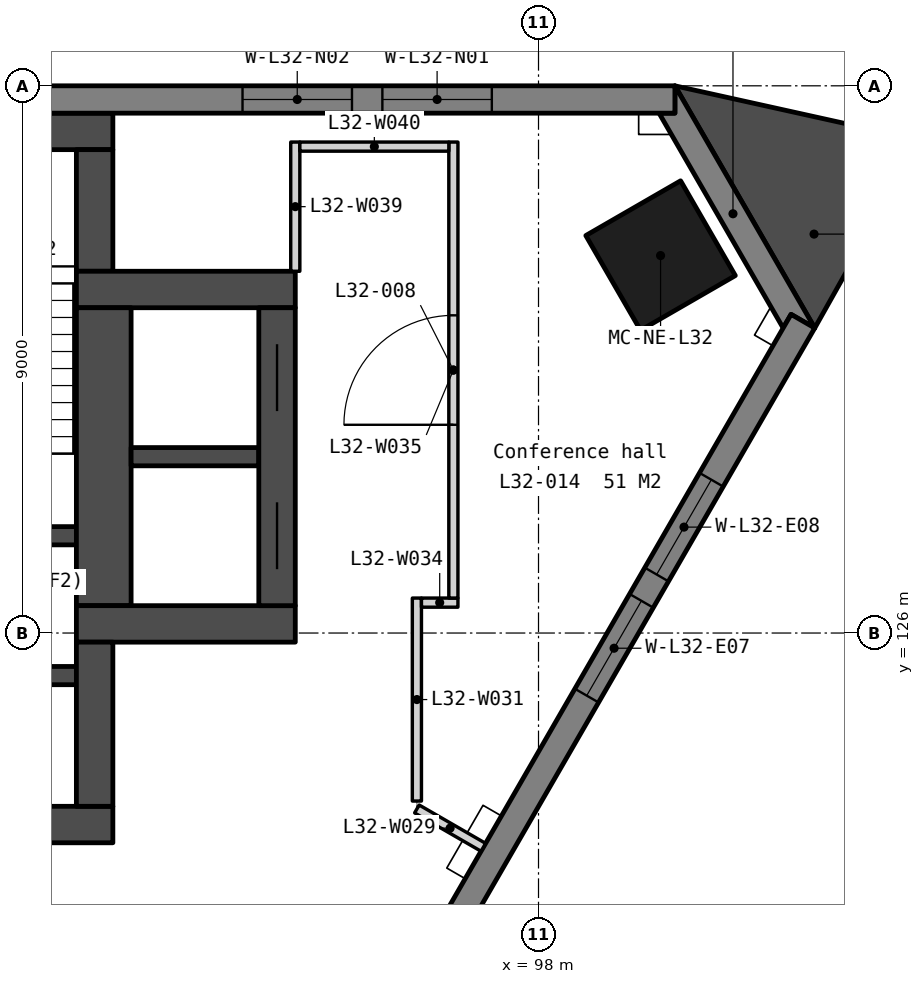
"""IFC4 building model, lengths in metres.
Left out: names, types, materials, properties, quantities, classifications, styles, units other than length and angle.
Written with IfcOpenShell. Run it as: python <this file> out.ifc"""

import sys

from ifc_helpers import new_model, si_unit, direction, frame, frame_2d, origin, origin_2d, place, context, subcontext, project, spatial, polyline, rectangle, outline, extrude, element, fill, save


model = new_model("IFC4")
c1 = context("Model", 3, precision=1e-05, world=origin(), true_north=direction((0.0, 1.0)))
c2 = subcontext(c1, "Body", "Model", "MODEL_VIEW")
j1 = project(units=[si_unit("LENGTHUNIT", "METRE"), si_unit("PLANEANGLEUNIT", "RADIAN")], contexts=[c1])
p1 = place(None, origin())
s1 = spatial("IfcSite", under=j1, at=p1, CompositionType="ELEMENT")
p2 = place(p1, origin())
s2 = spatial("IfcBuilding", under=s1, at=p2, CompositionType="ELEMENT")
p3 = place(p2, frame((0.0, 0.0, 128.6)))
s3 = spatial("IfcBuildingStorey", under=s2, at=p3, CompositionType="ELEMENT", Elevation=128.6)
p4 = place(p3, frame((100.007, 132.208, 0.0), z_axis=(0.0, 0.0, 1.0), x_axis=(-0.5, 0.866025403784, 0.0)))
e1 = element("IfcColumn", 1, at=p4, inside=s3, PredefinedType="COLUMN", context=c2, shape_type="SweptSolid", body=[
    extrude(rectangle(XDim=1.8, YDim=1.8, at=origin_2d()), origin(), (0.0, 0.0, 1.0), 3.9),
])
p5 = place(p3, frame((69.0, 134.25, 0.0), z_axis=(0.0, 0.0, 1.0), x_axis=(1.0, 0.0, 0.0)))
e2 = element("IfcWall", 2, at=p5, inside=s3, PredefinedType="SOLIDWALL", context=c2, shape_type="SweptSolid", body=[
    extrude(rectangle(XDim=22.0, YDim=0.6, at=frame_2d((11.0, 0.0))), origin(), (0.0, 0.0, 1.0), 3.75),
])
p6 = place(p3, frame((69.0, 122.85, 0.0), z_axis=(0.0, 0.0, 1.0), x_axis=(1.0, 0.0, 0.0)))
e3 = element("IfcWall", 3, at=p6, inside=s3, PredefinedType="SOLIDWALL", context=c2, shape_type="SweptSolid", body=[
    extrude(rectangle(XDim=22.0, YDim=0.6, at=frame_2d((11.0, 0.0))), origin(), (0.0, 0.0, 1.0), 3.75),
])
p7 = place(p6, frame((16.375, 0.0, 0.0)))
e4 = element("IfcOpeningElement", 4, at=p7, cuts=e3, PredefinedType="OPENING", context=c2, shape_type="SweptSolid", body=[
    extrude(rectangle(XDim=1.8, YDim=2.1, at=frame_2d((0.9, 1.05))), frame((0.0, 0.31, 0.0), z_axis=(0.0, -1.0, 0.0), x_axis=(1.0, 0.0, 0.0)), (0.0, 0.0, 1.0), 0.62),
])
p8 = place(p6, frame((3.825, 0.0, 0.0)))
e5 = element("IfcOpeningElement", 5, at=p8, cuts=e3, PredefinedType="OPENING", context=c2, shape_type="SweptSolid", body=[
    extrude(rectangle(XDim=1.8, YDim=2.1, at=frame_2d((0.9, 1.05))), frame((0.0, 0.31, 0.0), z_axis=(0.0, -1.0, 0.0), x_axis=(1.0, 0.0, 0.0)), (0.0, 0.0, 1.0), 0.62),
])
p9 = place(p6, frame((12.85, 0.0, 0.0)))
e6 = element("IfcOpeningElement", 6, at=p9, cuts=e3, PredefinedType="OPENING", context=c2, shape_type="SweptSolid", body=[
    extrude(rectangle(XDim=1.5, YDim=2.1, at=frame_2d((0.75, 1.05))), frame((0.0, 0.31, 0.0), z_axis=(0.0, -1.0, 0.0), x_axis=(1.0, 0.0, 0.0)), (0.0, 0.0, 1.0), 0.62),
])
for number, where, z_axis, x_axis in (
    (7, (87.85, 127.6, 0.0), (0.0, 0.0, 1.0), (1.0, 0.0, 0.0)),
    (8, (87.85, 125.3, 0.0), (0.0, 0.0, 1.0), (1.0, 0.0, 0.0)),
):
    element("IfcWall", number, at=place(p3, frame(where, z_axis=z_axis, x_axis=x_axis)), inside=s3, PredefinedType="SOLIDWALL", context=c2, shape_type="SweptSolid", body=[
        extrude(rectangle(XDim=2.55, YDim=0.3, at=frame_2d((1.275, 0.0))), origin(), (0.0, 0.0, 1.0), 3.75),
    ])
p10 = place(p3, frame((90.7, 133.95, 0.0), z_axis=(0.0, 0.0, 1.0), x_axis=(0.0, -1.0, 0.0)))
e9 = element("IfcWall", 9, at=p10, inside=s3, PredefinedType="SOLIDWALL", context=c2, shape_type="SweptSolid", body=[
    extrude(rectangle(XDim=2.0, YDim=0.6, at=frame_2d((1.0, 0.0))), origin(), (0.0, 0.0, 1.0), 3.75),
])
p11 = place(p3, frame((90.4, 131.65, 0.0), z_axis=(0.0, 0.0, 1.0), x_axis=(1.0, 0.0, 0.0)))
e10 = element("IfcWall", 10, at=p11, inside=s3, PredefinedType="SOLIDWALL", context=c2, shape_type="SweptSolid", body=[
    extrude(rectangle(XDim=3.6, YDim=0.6, at=frame_2d((1.8, 0.0))), origin(), (0.0, 0.0, 1.0), 3.75),
])
p12 = place(p3, frame((90.85, 131.35, 0.0), z_axis=(0.0, 0.0, 1.0), x_axis=(0.0, -1.0, 0.0)))
e11 = element("IfcWall", 11, at=p12, inside=s3, PredefinedType="SOLIDWALL", context=c2, shape_type="SweptSolid", body=[
    extrude(rectangle(XDim=4.9, YDim=0.9, at=frame_2d((2.45, 0.0))), origin(), (0.0, 0.0, 1.0), 3.75),
])
p13 = place(p3, frame((90.4, 126.15, 0.0), z_axis=(0.0, 0.0, 1.0), x_axis=(1.0, 0.0, 0.0)))
e12 = element("IfcWall", 12, at=p13, inside=s3, PredefinedType="SOLIDWALL", context=c2, shape_type="SweptSolid", body=[
    extrude(rectangle(XDim=3.6, YDim=0.6, at=frame_2d((1.8, 0.0))), origin(), (0.0, 0.0, 1.0), 3.75),
])
p14 = place(p3, frame((90.7, 125.85, 0.0), z_axis=(0.0, 0.0, 1.0), x_axis=(0.0, -1.0, 0.0)))
e13 = element("IfcWall", 13, at=p14, inside=s3, PredefinedType="SOLIDWALL", context=c2, shape_type="SweptSolid", body=[
    extrude(rectangle(XDim=2.7, YDim=0.6, at=frame_2d((1.35, 0.0))), origin(), (0.0, 0.0, 1.0), 3.75),
])
p15 = place(p3, frame((91.3, 128.9, 0.0), z_axis=(0.0, 0.0, 1.0), x_axis=(1.0, 0.0, 0.0)))
e14 = element("IfcWall", 14, at=p15, inside=s3, PredefinedType="SOLIDWALL", context=c2, shape_type="SweptSolid", body=[
    extrude(rectangle(XDim=2.1, YDim=0.3, at=frame_2d((1.05, 0.0))), origin(), (0.0, 0.0, 1.0), 3.75),
])
p16 = place(p3, frame((93.7, 131.35, 0.0), z_axis=(0.0, 0.0, 1.0), x_axis=(0.0, -1.0, 0.0)))
e15 = element("IfcWall", 15, at=p16, inside=s3, PredefinedType="SOLIDWALL", context=c2, shape_type="SweptSolid", body=[
    extrude(rectangle(XDim=4.9, YDim=0.6, at=frame_2d((2.45, 0.0))), origin(), (0.0, 0.0, 1.0), 3.75),
])
p17 = place(p16, frame((0.6, 0.0, 0.0)))
e16 = element("IfcOpeningElement", 16, at=p17, cuts=e15, PredefinedType="OPENING", context=c2, shape_type="SweptSolid", body=[
    extrude(rectangle(XDim=1.1, YDim=2.1, at=frame_2d((0.55, 1.05))), frame((0.0, 0.31, 0.0), z_axis=(0.0, -1.0, 0.0), x_axis=(1.0, 0.0, 0.0)), (0.0, 0.0, 1.0), 0.62),
])
p18 = place(p16, frame((3.2, 0.0, 0.0)))
e17 = element("IfcOpeningElement", 17, at=p18, cuts=e15, PredefinedType="OPENING", context=c2, shape_type="SweptSolid", body=[
    extrude(rectangle(XDim=1.1, YDim=2.1, at=frame_2d((0.55, 1.05))), frame((0.0, 0.31, 0.0), z_axis=(0.0, -1.0, 0.0), x_axis=(1.0, 0.0, 0.0)), (0.0, 0.0, 1.0), 0.62),
])
p19 = place(p3, frame((0.0, 0.0, -0.45)))
e18 = element("IfcWall", 18, at=p19, inside=s3, PredefinedType="SOLIDWALL", context=c2, shape_type="SweptSolid", body=[
    extrude(outline(polyline([(102.543, 131.016), (102.153, 131.241), (102.023, 131.016), (99.983, 134.55), (100.243, 134.55), (100.243, 135.0), (102.543, 131.016)])), origin(), (0.0, 0.0, 1.0), 4.2),
])
p20 = place(p3, frame((100.243, 134.775, -0.45), z_axis=(0.0, 0.0, 1.0), x_axis=(-1.0, 0.0, 0.0)))
e19 = element("IfcWall", 19, at=p20, inside=s3, PredefinedType="SOLIDWALL", context=c2, shape_type="SweptSolid", body=[
    extrude(outline(polyline([(40.486, 0.0), (40.486, 4.2), (0.0, 4.2), (0.0, 0.0), (40.486, 0.0)])), frame((0.0, 0.225, 0.0), z_axis=(0.0, -1.0, 0.0), x_axis=(1.0, 0.0, 0.0)), (0.0, 0.0, 1.0), 0.45),
])
p21 = place(p20, frame((3.011, 0.0, 1.25)))
e20 = element("IfcOpeningElement", 20, at=p21, cuts=e19, PredefinedType="OPENING", context=c2, shape_type="SweptSolid", body=[
    extrude(rectangle(XDim=1.8, YDim=2.2, at=frame_2d((0.9, 1.1))), frame((0.0, 0.235, 0.0), z_axis=(0.0, -1.0, 0.0), x_axis=(1.0, 0.0, 0.0)), (0.0, 0.0, 1.0), 0.47),
])
p22 = place(p20, frame((5.311, 0.0, 1.25)))
e21 = element("IfcOpeningElement", 21, at=p22, cuts=e19, PredefinedType="OPENING", context=c2, shape_type="SweptSolid", body=[
    extrude(rectangle(XDim=1.8, YDim=2.2, at=frame_2d((0.9, 1.1))), frame((0.0, 0.235, 0.0), z_axis=(0.0, -1.0, 0.0), x_axis=(1.0, 0.0, 0.0)), (0.0, 0.0, 1.0), 0.47),
])
p23 = place(p20, frame((13.132, 0.0, 1.25)))
e22 = element("IfcOpeningElement", 22, at=p23, cuts=e19, PredefinedType="OPENING", context=c2, shape_type="SweptSolid", body=[
    extrude(rectangle(XDim=1.8, YDim=2.2, at=frame_2d((0.9, 1.1))), frame((0.0, 0.235, 0.0), z_axis=(0.0, -1.0, 0.0), x_axis=(1.0, 0.0, 0.0)), (0.0, 0.0, 1.0), 0.47),
])
p24 = place(p20, frame((15.432, 0.0, 1.25)))
e23 = element("IfcOpeningElement", 23, at=p24, cuts=e19, PredefinedType="OPENING", context=c2, shape_type="SweptSolid", body=[
    extrude(rectangle(XDim=1.8, YDim=2.2, at=frame_2d((0.9, 1.1))), frame((0.0, 0.235, 0.0), z_axis=(0.0, -1.0, 0.0), x_axis=(1.0, 0.0, 0.0)), (0.0, 0.0, 1.0), 0.47),
])
p25 = place(p20, frame((23.254, 0.0, 1.25)))
e24 = element("IfcOpeningElement", 24, at=p25, cuts=e19, PredefinedType="OPENING", context=c2, shape_type="SweptSolid", body=[
    extrude(rectangle(XDim=1.8, YDim=2.2, at=frame_2d((0.9, 1.1))), frame((0.0, 0.235, 0.0), z_axis=(0.0, -1.0, 0.0), x_axis=(1.0, 0.0, 0.0)), (0.0, 0.0, 1.0), 0.47),
])
p26 = place(p20, frame((25.554, 0.0, 1.25)))
e25 = element("IfcOpeningElement", 25, at=p26, cuts=e19, PredefinedType="OPENING", context=c2, shape_type="SweptSolid", body=[
    extrude(rectangle(XDim=1.8, YDim=2.2, at=frame_2d((0.9, 1.1))), frame((0.0, 0.235, 0.0), z_axis=(0.0, -1.0, 0.0), x_axis=(1.0, 0.0, 0.0)), (0.0, 0.0, 1.0), 0.47),
])
p27 = place(p20, frame((33.375, 0.0, 1.25)))
e26 = element("IfcOpeningElement", 26, at=p27, cuts=e19, PredefinedType="OPENING", context=c2, shape_type="SweptSolid", body=[
    extrude(rectangle(XDim=1.8, YDim=2.2, at=frame_2d((0.9, 1.1))), frame((0.0, 0.235, 0.0), z_axis=(0.0, -1.0, 0.0), x_axis=(1.0, 0.0, 0.0)), (0.0, 0.0, 1.0), 0.47),
])
p28 = place(p20, frame((35.675, 0.0, 1.25)))
e27 = element("IfcOpeningElement", 27, at=p28, cuts=e19, PredefinedType="OPENING", context=c2, shape_type="SweptSolid", body=[
    extrude(rectangle(XDim=1.8, YDim=2.2, at=frame_2d((0.9, 1.1))), frame((0.0, 0.235, 0.0), z_axis=(0.0, -1.0, 0.0), x_axis=(1.0, 0.0, 0.0)), (0.0, 0.0, 1.0), 0.47),
])
p29 = place(p3, frame((82.105, 96.067, -0.45), z_axis=(0.0, 0.0, 1.0), x_axis=(0.499997369791, 0.866026922331, 0.0)))
e28 = element("IfcWall", 28, at=p29, inside=s3, PredefinedType="SOLIDWALL", context=c2, shape_type="SweptSolid", body=[
    extrude(outline(polyline([(40.486, 0.0), (40.486, 4.2), (0.0, 4.2), (0.0, 0.0), (40.486, 0.0)])), frame((0.0, 0.225, 0.0), z_axis=(0.0, -1.0, 0.0), x_axis=(1.0, 0.0, 0.0)), (0.0, 0.0, 1.0), 0.45),
])
p30 = place(p29, frame((3.011, 0.0, 1.25)))
e29 = element("IfcOpeningElement", 29, at=p30, cuts=e28, PredefinedType="OPENING", context=c2, shape_type="SweptSolid", body=[
    extrude(rectangle(XDim=1.8, YDim=2.2, at=frame_2d((0.9, 1.1))), frame((0.0, 0.235, 0.0), z_axis=(0.0, -1.0, 0.0), x_axis=(1.0, 0.0, 0.0)), (0.0, 0.0, 1.0), 0.47),
])
p31 = place(p29, frame((5.311, 0.0, 1.25)))
e30 = element("IfcOpeningElement", 30, at=p31, cuts=e28, PredefinedType="OPENING", context=c2, shape_type="SweptSolid", body=[
    extrude(rectangle(XDim=1.8, YDim=2.2, at=frame_2d((0.9, 1.1))), frame((0.0, 0.235, 0.0), z_axis=(0.0, -1.0, 0.0), x_axis=(1.0, 0.0, 0.0)), (0.0, 0.0, 1.0), 0.47),
])
p32 = place(p29, frame((13.132, 0.0, 1.25)))
e31 = element("IfcOpeningElement", 31, at=p32, cuts=e28, PredefinedType="OPENING", context=c2, shape_type="SweptSolid", body=[
    extrude(rectangle(XDim=1.8, YDim=2.2, at=frame_2d((0.9, 1.1))), frame((0.0, 0.235, 0.0), z_axis=(0.0, -1.0, 0.0), x_axis=(1.0, 0.0, 0.0)), (0.0, 0.0, 1.0), 0.47),
])
p33 = place(p29, frame((15.432, 0.0, 1.25)))
e32 = element("IfcOpeningElement", 32, at=p33, cuts=e28, PredefinedType="OPENING", context=c2, shape_type="SweptSolid", body=[
    extrude(rectangle(XDim=1.8, YDim=2.2, at=frame_2d((0.9, 1.1))), frame((0.0, 0.235, 0.0), z_axis=(0.0, -1.0, 0.0), x_axis=(1.0, 0.0, 0.0)), (0.0, 0.0, 1.0), 0.47),
])
p34 = place(p29, frame((23.254, 0.0, 1.25)))
e33 = element("IfcOpeningElement", 33, at=p34, cuts=e28, PredefinedType="OPENING", context=c2, shape_type="SweptSolid", body=[
    extrude(rectangle(XDim=1.8, YDim=2.2, at=frame_2d((0.9, 1.1))), frame((0.0, 0.235, 0.0), z_axis=(0.0, -1.0, 0.0), x_axis=(1.0, 0.0, 0.0)), (0.0, 0.0, 1.0), 0.47),
])
p35 = place(p29, frame((25.554, 0.0, 1.25)))
e34 = element("IfcOpeningElement", 34, at=p35, cuts=e28, PredefinedType="OPENING", context=c2, shape_type="SweptSolid", body=[
    extrude(rectangle(XDim=1.8, YDim=2.2, at=frame_2d((0.9, 1.1))), frame((0.0, 0.235, 0.0), z_axis=(0.0, -1.0, 0.0), x_axis=(1.0, 0.0, 0.0)), (0.0, 0.0, 1.0), 0.47),
])
p36 = place(p29, frame((33.375, 0.0, 1.25)))
e35 = element("IfcOpeningElement", 35, at=p36, cuts=e28, PredefinedType="OPENING", context=c2, shape_type="SweptSolid", body=[
    extrude(rectangle(XDim=1.8, YDim=2.2, at=frame_2d((0.9, 1.1))), frame((0.0, 0.235, 0.0), z_axis=(0.0, -1.0, 0.0), x_axis=(1.0, 0.0, 0.0)), (0.0, 0.0, 1.0), 0.47),
])
p37 = place(p29, frame((35.675, 0.0, 1.25)))
e36 = element("IfcOpeningElement", 36, at=p37, cuts=e28, PredefinedType="OPENING", context=c2, shape_type="SweptSolid", body=[
    extrude(rectangle(XDim=1.8, YDim=2.2, at=frame_2d((0.9, 1.1))), frame((0.0, 0.235, 0.0), z_axis=(0.0, -1.0, 0.0), x_axis=(1.0, 0.0, 0.0)), (0.0, 0.0, 1.0), 0.47),
])
p38 = place(p3, frame((0.0, 0.0, -0.45)))
e37 = element("IfcWall", 37, at=p38, inside=s3, PredefinedType="SOLIDWALL", context=c2, shape_type="SweptSolid", body=[
    extrude(outline(polyline([(102.543, 131.016), (104.28, 134.106), (100.243, 135.0), (102.543, 131.016)])), origin(), (0.0, 0.0, 1.0), 4.2),
])
p39 = place(p3, frame((96.0, 123.107, 0.0), z_axis=(0.0, 0.0, 1.0), x_axis=(0.865995441363, -0.500051892845, 0.0)))
e38 = element("IfcWall", 38, at=p39, inside=s3, PredefinedType="PARTITIONING", context=c2, shape_type="SweptSolid", body=[
    extrude(rectangle(XDim=1.261, YDim=0.15, at=frame_2d((0.631, 0.0))), origin(), (0.0, 0.0, 1.0), 3.75),
])
p40 = place(p3, frame((96.0, 123.237, 0.0), z_axis=(0.0, 0.0, 1.0), x_axis=(0.0, 1.0, 0.0)))
e39 = element("IfcWall", 39, at=p40, inside=s3, PredefinedType="PARTITIONING", context=c2, shape_type="SweptSolid", body=[
    extrude(rectangle(XDim=3.338, YDim=0.15, at=frame_2d((1.669, 0.0))), origin(), (0.0, 0.0, 1.0), 3.75),
])
p41 = place(p3, frame((96.075, 126.5, 0.0), z_axis=(0.0, 0.0, 1.0), x_axis=(1.0, 0.0, 0.0)))
e40 = element("IfcWall", 40, at=p41, inside=s3, PredefinedType="PARTITIONING", context=c2, shape_type="SweptSolid", body=[
    extrude(rectangle(XDim=0.6, YDim=0.15, at=frame_2d((0.3, 0.0))), origin(), (0.0, 0.0, 1.0), 3.75),
])
p42 = place(p3, frame((96.6, 126.575, 0.0), z_axis=(0.0, 0.0, 1.0), x_axis=(0.0, 1.0, 0.0)))
e41 = element("IfcWall", 41, at=p42, inside=s3, PredefinedType="PARTITIONING", context=c2, shape_type="SweptSolid", body=[
    extrude(rectangle(XDim=7.5, YDim=0.15, at=frame_2d((3.75, 0.0))), origin(), (0.0, 0.0, 1.0), 3.75),
])
p43 = place(p42, frame((2.85, 0.0, 0.0)))
e42 = element("IfcOpeningElement", 42, at=p43, cuts=e41, PredefinedType="OPENING", context=c2, shape_type="SweptSolid", body=[
    extrude(rectangle(XDim=1.8, YDim=2.1, at=frame_2d((0.9, 1.05))), frame((0.0, 0.085, 0.0), z_axis=(0.0, -1.0, 0.0), x_axis=(1.0, 0.0, 0.0)), (0.0, 0.0, 1.0), 0.17),
])
p44 = place(p3, frame((94.0, 131.95, 0.0), z_axis=(0.0, 0.0, 1.0), x_axis=(0.0, 1.0, 0.0)))
e43 = element("IfcWall", 43, at=p44, inside=s3, PredefinedType="PARTITIONING", context=c2, shape_type="SweptSolid", body=[
    extrude(rectangle(XDim=2.125, YDim=0.15, at=frame_2d((1.062, 0.0))), origin(), (0.0, 0.0, 1.0), 3.75),
])
p45 = place(p3, frame((94.075, 134.0, 0.0), z_axis=(0.0, 0.0, 1.0), x_axis=(1.0, 0.0, 0.0)))
e44 = element("IfcWall", 44, at=p45, inside=s3, PredefinedType="PARTITIONING", context=c2, shape_type="SweptSolid", body=[
    extrude(rectangle(XDim=2.45, YDim=0.15, at=frame_2d((1.225, 0.0))), origin(), (0.0, 0.0, 1.0), 3.207),
])
p46 = place(p17, origin())
e45 = element("IfcDoor", 45, at=p46, inside=s3, OperationType="SLIDING_TO_LEFT", PredefinedType="DOOR", context=c2, shape_type="SweptSolid", body=[
    extrude(rectangle(XDim=1.1, YDim=2.1, at=frame_2d((0.55, 1.05))), frame((0.0, 0.025, 0.0), z_axis=(0.0, -1.0, 0.0), x_axis=(1.0, 0.0, 0.0)), (0.0, 0.0, 1.0), 0.05),
])
fill(e16, e45)
p47 = place(p18, origin())
e46 = element("IfcDoor", 46, at=p47, inside=s3, OperationType="SLIDING_TO_LEFT", PredefinedType="DOOR", context=c2, shape_type="SweptSolid", body=[
    extrude(rectangle(XDim=1.1, YDim=2.1, at=frame_2d((0.55, 1.05))), frame((0.0, 0.025, 0.0), z_axis=(0.0, -1.0, 0.0), x_axis=(1.0, 0.0, 0.0)), (0.0, 0.0, 1.0), 0.05),
])
fill(e17, e46)
p48 = place(p21, origin())
e47 = element("IfcWindow", 47, at=p48, inside=s3, PartitioningType="SINGLE_PANEL", PredefinedType="WINDOW", context=c2, shape_type="SweptSolid", body=[
    extrude(rectangle(XDim=1.8, YDim=2.2, at=frame_2d((0.9, 1.1))), frame((0.0, 0.03, 0.0), z_axis=(0.0, -1.0, 0.0), x_axis=(1.0, 0.0, 0.0)), (0.0, 0.0, 1.0), 0.06),
])
fill(e20, e47)
p49 = place(p22, origin())
e48 = element("IfcWindow", 48, at=p49, inside=s3, PartitioningType="SINGLE_PANEL", PredefinedType="WINDOW", context=c2, shape_type="SweptSolid", body=[
    extrude(rectangle(XDim=1.8, YDim=2.2, at=frame_2d((0.9, 1.1))), frame((0.0, 0.03, 0.0), z_axis=(0.0, -1.0, 0.0), x_axis=(1.0, 0.0, 0.0)), (0.0, 0.0, 1.0), 0.06),
])
fill(e21, e48)
p50 = place(p36, origin())
e49 = element("IfcWindow", 49, at=p50, inside=s3, PartitioningType="SINGLE_PANEL", PredefinedType="WINDOW", context=c2, shape_type="SweptSolid", body=[
    extrude(rectangle(XDim=1.8, YDim=2.2, at=frame_2d((0.9, 1.1))), frame((0.0, 0.03, 0.0), z_axis=(0.0, -1.0, 0.0), x_axis=(1.0, 0.0, 0.0)), (0.0, 0.0, 1.0), 0.06),
])
fill(e35, e49)
p51 = place(p37, origin())
e50 = element("IfcWindow", 50, at=p51, inside=s3, PartitioningType="SINGLE_PANEL", PredefinedType="WINDOW", context=c2, shape_type="SweptSolid", body=[
    extrude(rectangle(XDim=1.8, YDim=2.2, at=frame_2d((0.9, 1.1))), frame((0.0, 0.03, 0.0), z_axis=(0.0, -1.0, 0.0), x_axis=(1.0, 0.0, 0.0)), (0.0, 0.0, 1.0), 0.06),
])
fill(e36, e50)
p52 = place(p43, origin())
e51 = element("IfcDoor", 51, at=p52, inside=s3, OperationType="SINGLE_SWING_LEFT", PredefinedType="DOOR", context=c2, shape_type="SweptSolid", body=[
    extrude(rectangle(XDim=1.8, YDim=2.1, at=frame_2d((0.9, 1.05))), frame((0.0, 0.025, 0.0), z_axis=(0.0, -1.0, 0.0), x_axis=(1.0, 0.0, 0.0)), (0.0, 0.0, 1.0), 0.05),
])
fill(e42, e51)
save(model, sys.argv[1])
